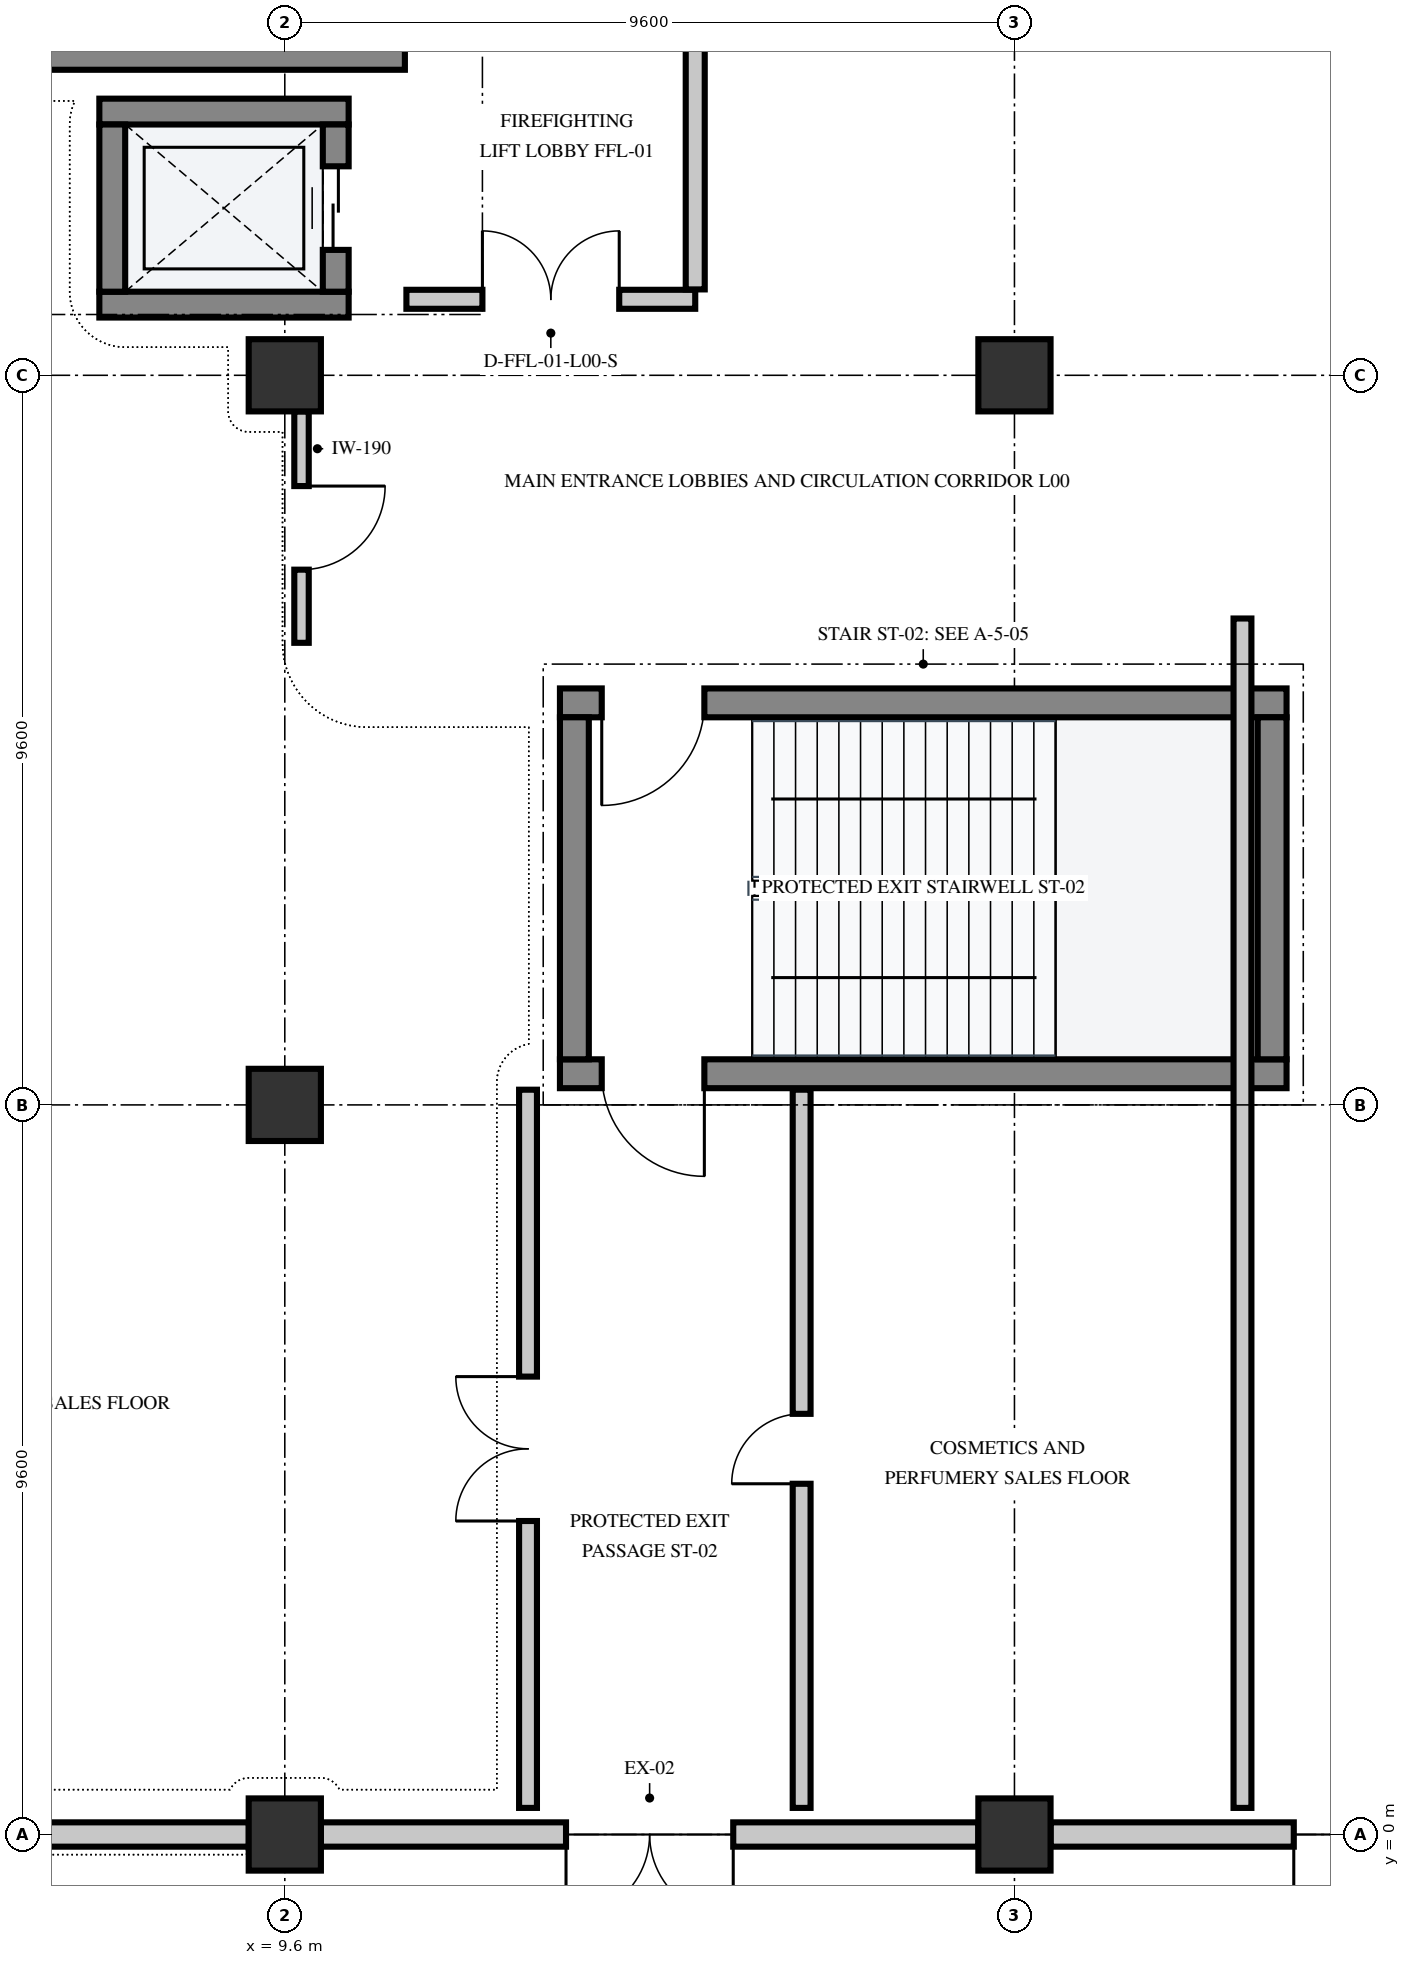
"""IFC4 building model, lengths in metres.
Left out: names, types, materials, properties, quantities, classifications, styles, units other than length and angle.
Written with IfcOpenShell. Run it as: python <this file> out.ifc"""

import sys

from ifc_helpers import new_model, si_unit, direction, frame, frame_2d, origin, origin_2d, place, context, subcontext, project, spatial, rectangle, extrude, element, fill, save


model = new_model("IFC4")
c1 = context("Model", 3, precision=1e-05, world=origin(), true_north=direction((0.0, 1.0)))
c2 = subcontext(c1, "Body", "Model", "MODEL_VIEW")
j1 = project(units=[si_unit("LENGTHUNIT", "METRE"), si_unit("PLANEANGLEUNIT", "RADIAN")], contexts=[c1])
p1 = place(None, origin())
s1 = spatial("IfcSite", under=j1, at=p1, CompositionType="ELEMENT")
p2 = place(p1, origin())
s2 = spatial("IfcBuilding", under=s1, at=p2, CompositionType="ELEMENT")
p3 = place(p2, origin())
s3 = spatial("IfcBuildingStorey", under=s2, at=p3, CompositionType="ELEMENT", Elevation=0.0)
p4 = place(p3, frame((9.6, 0.0, -0.3), z_axis=(0.0, 0.0, 1.0), x_axis=(1.0, 0.0, 0.0)))
e1 = element("IfcColumn", 1, at=p4, inside=s3, PredefinedType="COLUMN", context=c2, shape_type="SweptSolid", body=[
    extrude(rectangle(XDim=0.95, YDim=0.95, at=origin_2d()), origin(), (0.0, 0.0, 1.0), 5.7),
])
for number, where, z_axis, x_axis in (
    (2, (9.6, 9.6, 0.0), (0.0, 0.0, 1.0), (1.0, 0.0, 0.0)),
    (3, (9.6, 19.2, 0.0), (0.0, 0.0, 1.0), (1.0, 0.0, 0.0)),
    (4, (19.2, 0.0, 0.0), (0.0, 0.0, 1.0), (1.0, 0.0, 0.0)),
    (5, (19.2, 19.2, 0.0), (0.0, 0.0, 1.0), (1.0, 0.0, 0.0)),
):
    element("IfcColumn", number, at=place(p3, frame(where, z_axis=z_axis, x_axis=x_axis)), inside=s3, PredefinedType="COLUMN", context=c2, shape_type="SweptSolid", body=[
        extrude(rectangle(XDim=0.95, YDim=0.95, at=origin_2d()), origin(), (0.0, 0.0, 1.0), 5.4),
    ])
p5 = place(p3, frame((28.325, 0.0, 0.0), z_axis=(0.0, 0.0, 1.0), x_axis=(-1.0, 0.0, 0.0)))
e6 = element("IfcWall", 6, at=p5, inside=s3, PredefinedType="SOLIDWALL", context=c2, shape_type="SweptSolid", body=[
    extrude(rectangle(XDim=8.65, YDim=0.32, at=frame_2d((4.325, 0.0))), origin(), (0.0, 0.0, 1.0), 5.09),
])
p6 = place(p5, frame((3.2, 0.0, 0.0)))
e7 = element("IfcOpeningElement", 7, at=p6, cuts=e6, PredefinedType="OPENING", context=c2, shape_type="SweptSolid", body=[
    extrude(rectangle(XDim=2.25, YDim=2.35, at=frame_2d((1.125, 1.175))), frame((0.0, 0.172, 0.0), z_axis=(0.0, -1.0, 0.0), x_axis=(1.0, 0.0, 0.0)), (0.0, 0.0, 1.0), 0.344),
])
p7 = place(p3, frame((18.725, 0.0, 0.0), z_axis=(0.0, 0.0, 1.0), x_axis=(-1.0, 0.0, 0.0)))
e8 = element("IfcWall", 8, at=p7, inside=s3, PredefinedType="SOLIDWALL", context=c2, shape_type="SweptSolid", body=[
    extrude(rectangle(XDim=8.65, YDim=0.32, at=frame_2d((4.325, 0.0))), origin(), (0.0, 0.0, 1.0), 5.09),
])
p8 = place(p7, frame((3.225, 0.0, 0.0)))
e9 = element("IfcOpeningElement", 9, at=p8, cuts=e8, PredefinedType="OPENING", context=c2, shape_type="SweptSolid", body=[
    extrude(rectangle(XDim=2.2, YDim=2.3, at=frame_2d((1.1, 1.15))), frame((0.0, 0.172, 0.0), z_axis=(0.0, -1.0, 0.0), x_axis=(1.0, 0.0, 0.0)), (0.0, 0.0, 1.0), 0.344),
])
p9 = place(p3, frame((9.127, 0.0, 0.0), z_axis=(0.0, 0.0, 1.0), x_axis=(-1.0, 0.0, 0.0)))
e10 = element("IfcWall", 10, at=p9, inside=s3, PredefinedType="SOLIDWALL", context=c2, shape_type="SweptSolid", body=[
    extrude(rectangle(XDim=8.654, YDim=0.32, at=frame_2d((4.327, 0.0))), origin(), (0.0, 0.0, 1.0), 5.09),
])
p10 = place(p9, frame((3.327, 0.0, 2.25)))
e11 = element("IfcOpeningElement", 11, at=p10, cuts=e10, PredefinedType="OPENING", context=c2, shape_type="SweptSolid", body=[
    extrude(rectangle(XDim=2.0, YDim=1.1, at=frame_2d((1.0, 0.55))), frame((0.0, 0.172, 0.0), z_axis=(0.0, -1.0, 0.0), x_axis=(1.0, 0.0, 0.0)), (0.0, 0.0, 1.0), 0.344),
])
p11 = place(p3, frame((5.92, 23.41, 0.0), z_axis=(0.0, 0.0, 1.0), x_axis=(1.0, 0.0, 0.0)))
e12 = element("IfcWall", 12, at=p11, inside=s3, PredefinedType="SHEAR", context=c2, shape_type="SweptSolid", body=[
    extrude(rectangle(XDim=5.26, YDim=0.38, at=frame_2d((2.63, 0.0))), origin(), (0.0, 0.0, 1.0), 5.09),
])
p12 = place(p3, frame((13.22, 10.01, 0.0), z_axis=(0.0, 0.0, 1.0), x_axis=(1.0, 0.0, 0.0)))
e13 = element("IfcWall", 13, at=p12, inside=s3, PredefinedType="SHEAR", context=c2, shape_type="SweptSolid", body=[
    extrude(rectangle(XDim=9.56, YDim=0.38, at=frame_2d((4.78, 0.0))), origin(), (0.0, 0.0, 1.0), 5.09),
])
p13 = place(p12, frame((0.55, 0.0, 0.0)))
e14 = element("IfcOpeningElement", 14, at=p13, cuts=e13, PredefinedType="OPENING", context=c2, shape_type="SweptSolid", body=[
    extrude(rectangle(XDim=1.35, YDim=2.2, at=frame_2d((0.675, 1.1))), frame((0.0, 0.202, 0.0), z_axis=(0.0, -1.0, 0.0), x_axis=(1.0, 0.0, 0.0)), (0.0, 0.0, 1.0), 0.404),
])
p14 = place(p3, frame((13.22, 14.89, 0.0), z_axis=(0.0, 0.0, 1.0), x_axis=(1.0, 0.0, 0.0)))
e15 = element("IfcWall", 15, at=p14, inside=s3, PredefinedType="SHEAR", context=c2, shape_type="SweptSolid", body=[
    extrude(rectangle(XDim=9.56, YDim=0.38, at=frame_2d((4.78, 0.0))), origin(), (0.0, 0.0, 1.0), 5.09),
])
p15 = place(p14, frame((0.55, 0.0, 0.0)))
e16 = element("IfcOpeningElement", 16, at=p15, cuts=e15, PredefinedType="OPENING", context=c2, shape_type="SweptSolid", body=[
    extrude(rectangle(XDim=1.35, YDim=2.2, at=frame_2d((0.675, 1.1))), frame((0.0, 0.202, 0.0), z_axis=(0.0, -1.0, 0.0), x_axis=(1.0, 0.0, 0.0)), (0.0, 0.0, 1.0), 0.404),
])
for number, where, z_axis, x_axis in (
    (17, (22.59, 10.2, 0.0), (0.0, 0.0, 1.0), (0.0, 1.0, 0.0)),
    (18, (13.41, 10.2, 0.0), (0.0, 0.0, 1.0), (0.0, 1.0, 0.0)),
):
    element("IfcWall", number, at=place(p3, frame(where, z_axis=z_axis, x_axis=x_axis)), inside=s3, PredefinedType="SHEAR", context=c2, shape_type="SweptSolid", body=[
        extrude(rectangle(XDim=4.5, YDim=0.38, at=frame_2d((2.25, 0.0))), origin(), (0.0, 0.0, 1.0), 5.09),
    ])
for number, where, z_axis, x_axis in (
    (19, (7.16, 20.13, 0.0), (0.0, 0.0, 1.0), (1.0, 0.0, 0.0)),
    (20, (7.16, 22.67, 0.0), (0.0, 0.0, 1.0), (1.0, 0.0, 0.0)),
):
    element("IfcWall", number, at=place(p3, frame(where, z_axis=z_axis, x_axis=x_axis)), inside=s3, PredefinedType="SHEAR", context=c2, shape_type="SweptSolid", body=[
        extrude(rectangle(XDim=3.28, YDim=0.34, at=frame_2d((1.64, 0.0))), origin(), (0.0, 0.0, 1.0), 5.09),
    ])
p16 = place(p3, frame((7.33, 20.3, 0.0), z_axis=(0.0, 0.0, 1.0), x_axis=(0.0, 1.0, 0.0)))
e21 = element("IfcWall", 21, at=p16, inside=s3, PredefinedType="SHEAR", context=c2, shape_type="SweptSolid", body=[
    extrude(rectangle(XDim=2.2, YDim=0.34, at=frame_2d((1.1, 0.0))), origin(), (0.0, 0.0, 1.0), 5.09),
])
p17 = place(p3, frame((10.27, 20.3, 0.0), z_axis=(0.0, 0.0, 1.0), x_axis=(0.0, 1.0, 0.0)))
e22 = element("IfcWall", 22, at=p17, inside=s3, PredefinedType="SHEAR", context=c2, shape_type="SweptSolid", body=[
    extrude(rectangle(XDim=2.2, YDim=0.34, at=frame_2d((1.1, 0.0))), origin(), (0.0, 0.0, 1.0), 5.09),
])
p18 = place(p17, frame((0.55, 0.0, 0.0)))
e23 = element("IfcOpeningElement", 23, at=p18, cuts=e22, PredefinedType="OPENING", context=c2, shape_type="SweptSolid", body=[
    extrude(rectangle(XDim=1.1, YDim=2.15, at=frame_2d((0.55, 1.075))), frame((0.0, 0.182, 0.0), z_axis=(0.0, -1.0, 0.0), x_axis=(1.0, 0.0, 0.0)), (0.0, 0.0, 1.0), 0.364),
])
p19 = place(p3, frame((11.2, 20.2, 0.0), z_axis=(0.0, 0.0, 1.0), x_axis=(1.0, 0.0, 0.0)))
e24 = element("IfcWall", 24, at=p19, inside=s3, PredefinedType="PARTITIONING", context=c2, shape_type="SweptSolid", body=[
    extrude(rectangle(XDim=3.8, YDim=0.25, at=frame_2d((1.9, 0.0))), origin(), (0.0, 0.0, 1.0), 5.09),
])
p20 = place(p19, frame((1.0, 0.0, 0.0)))
e25 = element("IfcOpeningElement", 25, at=p20, cuts=e24, PredefinedType="OPENING", context=c2, shape_type="SweptSolid", body=[
    extrude(rectangle(XDim=1.8, YDim=2.25, at=frame_2d((0.9, 1.125))), frame((0.0, 0.137, 0.0), z_axis=(0.0, -1.0, 0.0), x_axis=(1.0, 0.0, 0.0)), (0.0, 0.0, 1.0), 0.274),
])
p21 = place(p3, frame((15.0, 20.33, 0.0), z_axis=(0.0, 0.0, 1.0), x_axis=(0.0, 1.0, 0.0)))
e26 = element("IfcWall", 26, at=p21, inside=s3, PredefinedType="PARTITIONING", context=c2, shape_type="SweptSolid", body=[
    extrude(rectangle(XDim=7.14, YDim=0.25, at=frame_2d((3.57, 0.0))), origin(), (0.0, 0.0, 1.0), 5.09),
])
p22 = place(p3, frame((12.8, 0.35, 0.0), z_axis=(0.0, 0.0, 1.0), x_axis=(0.0, 1.0, 0.0)))
e27 = element("IfcWall", 27, at=p22, inside=s3, PredefinedType="PARTITIONING", context=c2, shape_type="SweptSolid", body=[
    extrude(rectangle(XDim=9.45, YDim=0.235, at=frame_2d((4.725, 0.0))), origin(), (0.0, 0.0, 1.0), 5.09),
])
p23 = place(p22, frame((3.775, 0.0, 0.0)))
e28 = element("IfcOpeningElement", 28, at=p23, cuts=e27, PredefinedType="OPENING", context=c2, shape_type="SweptSolid", body=[
    extrude(rectangle(XDim=1.9, YDim=2.25, at=frame_2d((0.95, 1.125))), frame((0.0, 0.129, 0.0), z_axis=(0.0, -1.0, 0.0), x_axis=(1.0, 0.0, 0.0)), (0.0, 0.0, 1.0), 0.259),
])
p24 = place(p3, frame((16.4, 0.35, 0.0), z_axis=(0.0, 0.0, 1.0), x_axis=(0.0, 1.0, 0.0)))
e29 = element("IfcWall", 29, at=p24, inside=s3, PredefinedType="PARTITIONING", context=c2, shape_type="SweptSolid", body=[
    extrude(rectangle(XDim=9.45, YDim=0.235, at=frame_2d((4.725, 0.0))), origin(), (0.0, 0.0, 1.0), 5.09),
])
p25 = place(p24, frame((4.265, 0.0, 0.0)))
e30 = element("IfcOpeningElement", 30, at=p25, cuts=e29, PredefinedType="OPENING", context=c2, shape_type="SweptSolid", body=[
    extrude(rectangle(XDim=0.92, YDim=2.1, at=frame_2d((0.46, 1.05))), frame((0.0, 0.129, 0.0), z_axis=(0.0, -1.0, 0.0), x_axis=(1.0, 0.0, 0.0)), (0.0, 0.0, 1.0), 0.259),
])
p26 = place(p3, frame((22.2, 0.35, 0.0), z_axis=(0.0, 0.0, 1.0), x_axis=(0.0, 1.0, 0.0)))
e31 = element("IfcWall", 31, at=p26, inside=s3, PredefinedType="PARTITIONING", context=c2, shape_type="SweptSolid", body=[
    extrude(rectangle(XDim=15.65, YDim=0.235, at=frame_2d((7.825, 0.0))), origin(), (0.0, 0.0, 1.0), 5.09),
])
p27 = place(p3, frame((9.82, 18.725, 0.0), z_axis=(0.0, 0.0, 1.0), x_axis=(0.0, -1.0, 0.0)))
e32 = element("IfcWall", 32, at=p27, inside=s3, PredefinedType="PARTITIONING", context=c2, shape_type="SweptSolid", body=[
    extrude(rectangle(XDim=3.045, YDim=0.19, at=frame_2d((1.522, 0.0))), origin(), (0.0, 0.0, 1.0), 4.03),
])
p28 = place(p27, frame((0.982, 0.0, 0.0)))
e33 = element("IfcOpeningElement", 33, at=p28, cuts=e32, PredefinedType="OPENING", context=c2, shape_type="SweptSolid", body=[
    extrude(rectangle(XDim=1.1, YDim=2.15, at=frame_2d((0.55, 1.075))), frame((0.0, 0.107, 0.0), z_axis=(0.0, -1.0, 0.0), x_axis=(1.0, 0.0, 0.0)), (0.0, 0.0, 1.0), 0.214),
])
p29 = place(p6, origin())
e34 = element("IfcDoor", 34, at=p29, inside=s3, OperationType="DOUBLE_DOOR_SINGLE_SWING", PredefinedType="DOOR", context=c2, shape_type="SweptSolid", body=[
    extrude(rectangle(XDim=2.25, YDim=2.35, at=frame_2d((1.125, 1.175))), frame((0.0, 0.025, 0.0), z_axis=(0.0, -1.0, 0.0), x_axis=(1.0, 0.0, 0.0)), (0.0, 0.0, 1.0), 0.05),
])
fill(e7, e34)
p30 = place(p8, origin())
e35 = element("IfcDoor", 35, at=p30, inside=s3, OperationType="DOUBLE_DOOR_SINGLE_SWING", PredefinedType="DOOR", context=c2, shape_type="SweptSolid", body=[
    extrude(rectangle(XDim=2.2, YDim=2.3, at=frame_2d((1.1, 1.15))), frame((0.0, 0.025, 0.0), z_axis=(0.0, -1.0, 0.0), x_axis=(1.0, 0.0, 0.0)), (0.0, 0.0, 1.0), 0.05),
])
fill(e9, e35)
p31 = place(p15, frame((1.35, 0.0, 0.0), z_axis=(0.0, 0.0, 1.0), x_axis=(-1.0, 0.0, 0.0)))
e36 = element("IfcDoor", 36, at=p31, inside=s3, OperationType="SINGLE_SWING_RIGHT", PredefinedType="DOOR", context=c2, shape_type="SweptSolid", body=[
    extrude(rectangle(XDim=1.35, YDim=2.2, at=frame_2d((0.675, 1.1))), frame((0.0, 0.025, 0.0), z_axis=(0.0, -1.0, 0.0), x_axis=(1.0, 0.0, 0.0)), (0.0, 0.0, 1.0), 0.05),
])
fill(e16, e36)
p32 = place(p13, frame((1.35, 0.0, 0.0), z_axis=(0.0, 0.0, 1.0), x_axis=(-1.0, 0.0, 0.0)))
e37 = element("IfcDoor", 37, at=p32, inside=s3, OperationType="SINGLE_SWING_LEFT", PredefinedType="DOOR", context=c2, shape_type="SweptSolid", body=[
    extrude(rectangle(XDim=1.35, YDim=2.2, at=frame_2d((0.675, 1.1))), frame((0.0, 0.025, 0.0), z_axis=(0.0, -1.0, 0.0), x_axis=(1.0, 0.0, 0.0)), (0.0, 0.0, 1.0), 0.05),
])
fill(e14, e37)
p33 = place(p18, origin())
e38 = element("IfcDoor", 38, at=p33, inside=s3, OperationType="DOUBLE_DOOR_SLIDING", PredefinedType="DOOR", context=c2, shape_type="SweptSolid", body=[
    extrude(rectangle(XDim=1.1, YDim=2.15, at=frame_2d((0.55, 1.075))), frame((0.0, 0.025, 0.0), z_axis=(0.0, -1.0, 0.0), x_axis=(1.0, 0.0, 0.0)), (0.0, 0.0, 1.0), 0.05),
])
fill(e23, e38)
p34 = place(p20, origin())
e39 = element("IfcDoor", 39, at=p34, inside=s3, OperationType="DOUBLE_DOOR_SINGLE_SWING", PredefinedType="DOOR", context=c2, shape_type="SweptSolid", body=[
    extrude(rectangle(XDim=1.8, YDim=2.25, at=frame_2d((0.9, 1.125))), frame((0.0, 0.025, 0.0), z_axis=(0.0, -1.0, 0.0), x_axis=(1.0, 0.0, 0.0)), (0.0, 0.0, 1.0), 0.05),
])
fill(e25, e39)
p35 = place(p23, origin())
e40 = element("IfcDoor", 40, at=p35, inside=s3, OperationType="DOUBLE_DOOR_SINGLE_SWING", PredefinedType="DOOR", context=c2, shape_type="SweptSolid", body=[
    extrude(rectangle(XDim=1.9, YDim=2.25, at=frame_2d((0.95, 1.125))), frame((0.0, 0.025, 0.0), z_axis=(0.0, -1.0, 0.0), x_axis=(1.0, 0.0, 0.0)), (0.0, 0.0, 1.0), 0.05),
])
fill(e28, e40)
p36 = place(p25, origin())
e41 = element("IfcDoor", 41, at=p36, inside=s3, OperationType="SINGLE_SWING_LEFT", PredefinedType="DOOR", context=c2, shape_type="SweptSolid", body=[
    extrude(rectangle(XDim=0.92, YDim=2.1, at=frame_2d((0.46, 1.05))), frame((0.0, 0.025, 0.0), z_axis=(0.0, -1.0, 0.0), x_axis=(1.0, 0.0, 0.0)), (0.0, 0.0, 1.0), 0.05),
])
fill(e30, e41)
p37 = place(p28, origin())
e42 = element("IfcDoor", 42, at=p37, inside=s3, OperationType="SINGLE_SWING_LEFT", PredefinedType="DOOR", context=c2, shape_type="SweptSolid", body=[
    extrude(rectangle(XDim=1.1, YDim=2.15, at=frame_2d((0.55, 1.075))), frame((0.0, 0.025, 0.0), z_axis=(0.0, -1.0, 0.0), x_axis=(1.0, 0.0, 0.0)), (0.0, 0.0, 1.0), 0.05),
])
fill(e33, e42)
save(model, sys.argv[1])
